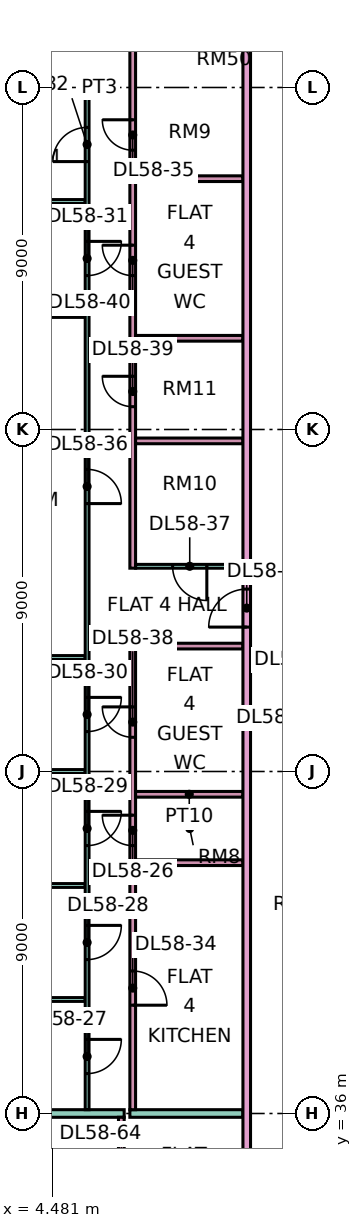
"""IFC4 building model, lengths in metres.
Left out: names, types, materials, properties, quantities, classifications, styles, units other than length and angle.
Written with IfcOpenShell. Run it as: python <this file> out.ifc"""

import sys

from ifc_helpers import new_model, si_unit, direction, frame, frame_2d, origin, place, context, subcontext, project, spatial, rectangle, extrude, element, fill, save


model = new_model("IFC4")
c1 = context("Model", 3, precision=1e-05, world=origin(), true_north=direction((0.0, 1.0)))
c2 = subcontext(c1, "Body", "Model", "MODEL_VIEW")
j1 = project(units=[si_unit("LENGTHUNIT", "METRE"), si_unit("PLANEANGLEUNIT", "RADIAN")], contexts=[c1])
p1 = place(None, origin())
s1 = spatial("IfcSite", under=j1, at=p1, CompositionType="ELEMENT")
p2 = place(p1, origin())
s2 = spatial("IfcBuilding", under=s1, at=p2, CompositionType="ELEMENT")
p3 = place(p2, frame((0.0, 0.0, 245.4)))
s3 = spatial("IfcBuildingStorey", under=s2, at=p3, CompositionType="ELEMENT", Elevation=245.4)
p4 = place(p3, frame((-1.351, 60.0, 0.0), z_axis=(0.0, 0.0, 1.0), x_axis=(1.0, 0.0, 0.0)))
e1 = element("IfcWall", 1, at=p4, inside=s3, PredefinedType="PARTITIONING", context=c2, shape_type="SweptSolid", body=[
    extrude(rectangle(XDim=6.701, YDim=0.1, at=frame_2d((3.351, 0.0))), origin(), (0.0, 0.0, 1.0), 3.35),
])
p5 = place(p3, frame((0.0, 36.0, 0.0), z_axis=(0.0, 0.0, 1.0), x_axis=(1.0, 0.0, 0.0)))
e2 = element("IfcWall", 2, at=p5, inside=s3, PredefinedType="PARTITIONING", context=c2, shape_type="SweptSolid", body=[
    extrude(rectangle(XDim=6.375, YDim=0.2, at=frame_2d((3.188, 0.0))), origin(), (0.0, 0.0, 1.0), 3.35),
])
p6 = place(p3, frame((0.0, 48.0, 0.0), z_axis=(0.0, 0.0, 1.0), x_axis=(1.0, 0.0, 0.0)))
e3 = element("IfcWall", 3, at=p6, inside=s3, PredefinedType="PARTITIONING", context=c2, shape_type="SweptSolid", body=[
    extrude(rectangle(XDim=5.35, YDim=0.1, at=frame_2d((2.675, 0.0))), origin(), (0.0, 0.0, 1.0), 3.35),
])
p7 = place(p3, frame((-1.35, 57.0, 0.0), z_axis=(0.0, 0.0, 1.0), x_axis=(1.0, 0.0, 0.0)))
e4 = element("IfcWall", 4, at=p7, inside=s3, PredefinedType="PARTITIONING", context=c2, shape_type="SweptSolid", body=[
    extrude(rectangle(XDim=6.7, YDim=0.1, at=frame_2d((3.35, 0.0))), origin(), (0.0, 0.0, 1.0), 3.35),
])
for number, where, z_axis, x_axis in (
    (5, (0.074, 39.0, 0.0), (0.0, 0.0, 1.0), (1.0, 0.0, 0.0)),
    (6, (0.074, 42.0, 0.0), (0.0, 0.0, 1.0), (1.0, 0.0, 0.0)),
    (7, (0.074, 45.0, 0.0), (0.0, 0.0, 1.0), (1.0, 0.0, 0.0)),
):
    element("IfcWall", number, at=place(p3, frame(where, z_axis=z_axis, x_axis=x_axis)), inside=s3, PredefinedType="PARTITIONING", context=c2, shape_type="SweptSolid", body=[
        extrude(rectangle(XDim=5.276, YDim=0.1, at=frame_2d((2.638, 0.0))), origin(), (0.0, 0.0, 1.0), 3.35),
    ])
p8 = place(p3, frame((5.4, 36.1, 0.0), z_axis=(0.0, 0.0, 1.0), x_axis=(0.0, 1.0, 0.0)))
e8 = element("IfcWall", 8, at=p8, inside=s3, PredefinedType="PARTITIONING", context=c2, shape_type="SweptSolid", body=[
    extrude(rectangle(XDim=26.95, YDim=0.1, at=frame_2d((13.475, 0.0))), origin(), (0.0, 0.0, 1.0), 3.35),
])
p9 = place(p8, frame((0.95, 0.0, 0.0)))
e9 = element("IfcOpeningElement", 9, at=p9, cuts=e8, PredefinedType="OPENING", context=c2, shape_type="SweptSolid", body=[
    extrude(rectangle(XDim=0.9, YDim=2.1, at=frame_2d((0.45, 1.05))), frame((0.0, 0.06, 0.0), z_axis=(0.0, -1.0, 0.0), x_axis=(1.0, 0.0, 0.0)), (0.0, 0.0, 1.0), 0.12),
])
p10 = place(p8, frame((3.95, 0.0, 0.0)))
e10 = element("IfcOpeningElement", 10, at=p10, cuts=e8, PredefinedType="OPENING", context=c2, shape_type="SweptSolid", body=[
    extrude(rectangle(XDim=0.9, YDim=2.1, at=frame_2d((0.45, 1.05))), frame((0.0, 0.06, 0.0), z_axis=(0.0, -1.0, 0.0), x_axis=(1.0, 0.0, 0.0)), (0.0, 0.0, 1.0), 0.12),
])
p11 = place(p8, frame((6.95, 0.0, 0.0)))
e11 = element("IfcOpeningElement", 11, at=p11, cuts=e8, PredefinedType="OPENING", context=c2, shape_type="SweptSolid", body=[
    extrude(rectangle(XDim=0.9, YDim=2.1, at=frame_2d((0.45, 1.05))), frame((0.0, 0.06, 0.0), z_axis=(0.0, -1.0, 0.0), x_axis=(1.0, 0.0, 0.0)), (0.0, 0.0, 1.0), 0.12),
])
p12 = place(p8, frame((9.95, 0.0, 0.0)))
e12 = element("IfcOpeningElement", 12, at=p12, cuts=e8, PredefinedType="OPENING", context=c2, shape_type="SweptSolid", body=[
    extrude(rectangle(XDim=0.9, YDim=2.1, at=frame_2d((0.45, 1.05))), frame((0.0, 0.06, 0.0), z_axis=(0.0, -1.0, 0.0), x_axis=(1.0, 0.0, 0.0)), (0.0, 0.0, 1.0), 0.12),
])
p13 = place(p8, frame((21.95, 0.0, 0.0)))
e13 = element("IfcOpeningElement", 13, at=p13, cuts=e8, PredefinedType="OPENING", context=c2, shape_type="SweptSolid", body=[
    extrude(rectangle(XDim=0.9, YDim=2.1, at=frame_2d((0.45, 1.05))), frame((0.0, 0.06, 0.0), z_axis=(0.0, -1.0, 0.0), x_axis=(1.0, 0.0, 0.0)), (0.0, 0.0, 1.0), 0.12),
])
p14 = place(p8, frame((24.95, 0.0, 0.0)))
e14 = element("IfcOpeningElement", 14, at=p14, cuts=e8, PredefinedType="OPENING", context=c2, shape_type="SweptSolid", body=[
    extrude(rectangle(XDim=0.9, YDim=2.1, at=frame_2d((0.45, 1.05))), frame((0.0, 0.06, 0.0), z_axis=(0.0, -1.0, 0.0), x_axis=(1.0, 0.0, 0.0)), (0.0, 0.0, 1.0), 0.12),
])
p15 = place(p8, frame((15.95, 0.0, 0.0)))
e15 = element("IfcOpeningElement", 15, at=p15, cuts=e8, PredefinedType="OPENING", context=c2, shape_type="SweptSolid", body=[
    extrude(rectangle(XDim=0.9, YDim=2.1, at=frame_2d((0.45, 1.05))), frame((0.0, 0.06, 0.0), z_axis=(0.0, -1.0, 0.0), x_axis=(1.0, 0.0, 0.0)), (0.0, 0.0, 1.0), 0.12),
])
p16 = place(p3, frame((5.45, 63.0, 0.0), z_axis=(0.0, 0.0, 1.0), x_axis=(1.0, 0.0, 0.0)))
e16 = element("IfcWall", 16, at=p16, inside=s3, PredefinedType="PARTITIONING", context=c2, shape_type="SweptSolid", body=[
    extrude(rectangle(XDim=0.55, YDim=0.1, at=frame_2d((0.275, 0.0))), origin(), (0.0, 0.0, 1.0), 3.35),
])
p17 = place(p3, frame((6.3, 26.325, 0.0), z_axis=(0.0, 0.0, 1.0), x_axis=(0.0, 1.0, 0.0)))
e17 = element("IfcWall", 17, at=p17, inside=s3, PredefinedType="PARTITIONING", context=c2, shape_type="SweptSolid", body=[
    extrude(rectangle(XDim=9.575, YDim=0.15, at=frame_2d((4.788, 0.0))), origin(), (0.0, 0.0, 1.0), 3.35),
])
p18 = place(p17, frame((4.575, 0.0, 0.0)))
e18 = element("IfcOpeningElement", 18, at=p18, cuts=e17, PredefinedType="OPENING", context=c2, shape_type="SweptSolid", body=[
    extrude(rectangle(XDim=0.8, YDim=2.1, at=frame_2d((0.4, 1.05))), frame((0.0, 0.085, 0.0), z_axis=(0.0, -1.0, 0.0), x_axis=(1.0, 0.0, 0.0)), (0.0, 0.0, 1.0), 0.17),
])
p19 = place(p17, frame((7.725, 0.0, 0.0)))
e19 = element("IfcOpeningElement", 19, at=p19, cuts=e17, PredefinedType="OPENING", context=c2, shape_type="SweptSolid", body=[
    extrude(rectangle(XDim=0.9, YDim=2.1, at=frame_2d((0.45, 1.05))), frame((0.0, 0.085, 0.0), z_axis=(0.0, -1.0, 0.0), x_axis=(1.0, 0.0, 0.0)), (0.0, 0.0, 1.0), 0.17),
])
p20 = place(p3, frame((6.525, 36.0, 0.0), z_axis=(0.0, 0.0, 1.0), x_axis=(1.0, 0.0, 0.0)))
e20 = element("IfcWall", 20, at=p20, inside=s3, PredefinedType="PARTITIONING", context=c2, shape_type="SweptSolid", body=[
    extrude(rectangle(XDim=2.975, YDim=0.2, at=frame_2d((1.488, 0.0))), origin(), (0.0, 0.0, 1.0), 3.35),
])
p21 = place(p3, frame((6.6, 36.1, 0.0), z_axis=(0.0, 0.0, 1.0), x_axis=(0.0, 1.0, 0.0)))
e21 = element("IfcWall", 21, at=p21, inside=s3, PredefinedType="PARTITIONING", context=c2, shape_type="SweptSolid", body=[
    extrude(rectangle(XDim=12.275, YDim=0.15, at=frame_2d((6.137, 0.0))), origin(), (0.0, 0.0, 1.0), 3.35),
])
p22 = place(p21, frame((6.95, 0.0, 0.0)))
e22 = element("IfcOpeningElement", 22, at=p22, cuts=e21, PredefinedType="OPENING", context=c2, shape_type="SweptSolid", body=[
    extrude(rectangle(XDim=0.8, YDim=2.1, at=frame_2d((0.4, 1.05))), frame((0.0, 0.085, 0.0), z_axis=(0.0, -1.0, 0.0), x_axis=(1.0, 0.0, 0.0)), (0.0, 0.0, 1.0), 0.17),
])
p23 = place(p21, frame((2.75, 0.0, 0.0)))
e23 = element("IfcOpeningElement", 23, at=p23, cuts=e21, PredefinedType="OPENING", context=c2, shape_type="SweptSolid", body=[
    extrude(rectangle(XDim=0.9, YDim=2.1, at=frame_2d((0.45, 1.05))), frame((0.0, 0.085, 0.0), z_axis=(0.0, -1.0, 0.0), x_axis=(1.0, 0.0, 0.0)), (0.0, 0.0, 1.0), 0.17),
])
p24 = place(p21, frame((9.8, 0.0, 0.0)))
e24 = element("IfcOpeningElement", 24, at=p24, cuts=e21, PredefinedType="OPENING", context=c2, shape_type="SweptSolid", body=[
    extrude(rectangle(XDim=0.8, YDim=2.1, at=frame_2d((0.4, 1.05))), frame((0.0, 0.085, 0.0), z_axis=(0.0, -1.0, 0.0), x_axis=(1.0, 0.0, 0.0)), (0.0, 0.0, 1.0), 0.17),
])
p25 = place(p3, frame((6.6, 50.35, 0.0), z_axis=(0.0, 0.0, 1.0), x_axis=(0.0, 1.0, 0.0)))
e25 = element("IfcWall", 25, at=p25, inside=s3, PredefinedType="PARTITIONING", context=c2, shape_type="SweptSolid", body=[
    extrude(rectangle(XDim=14.0, YDim=0.15, at=frame_2d((7.0, 0.0))), origin(), (0.0, 0.0, 1.0), 3.35),
])
p26 = place(p25, frame((11.0, 0.0, 0.0)))
e26 = element("IfcOpeningElement", 26, at=p26, cuts=e25, PredefinedType="OPENING", context=c2, shape_type="SweptSolid", body=[
    extrude(rectangle(XDim=0.8, YDim=2.1, at=frame_2d((0.4, 1.05))), frame((0.0, 0.085, 0.0), z_axis=(0.0, -1.0, 0.0), x_axis=(1.0, 0.0, 0.0)), (0.0, 0.0, 1.0), 0.17),
])
p27 = place(p25, frame((4.25, 0.0, 0.0)))
e27 = element("IfcOpeningElement", 27, at=p27, cuts=e25, PredefinedType="OPENING", context=c2, shape_type="SweptSolid", body=[
    extrude(rectangle(XDim=0.8, YDim=2.1, at=frame_2d((0.4, 1.05))), frame((0.0, 0.085, 0.0), z_axis=(0.0, -1.0, 0.0), x_axis=(1.0, 0.0, 0.0)), (0.0, 0.0, 1.0), 0.17),
])
p28 = place(p25, frame((7.7, 0.0, 0.0)))
e28 = element("IfcOpeningElement", 28, at=p28, cuts=e25, PredefinedType="OPENING", context=c2, shape_type="SweptSolid", body=[
    extrude(rectangle(XDim=0.8, YDim=2.1, at=frame_2d((0.4, 1.05))), frame((0.0, 0.085, 0.0), z_axis=(0.0, -1.0, 0.0), x_axis=(1.0, 0.0, 0.0)), (0.0, 0.0, 1.0), 0.17),
])
for number, where, z_axis, x_axis in (
    (29, (6.675, 42.6, 0.0), (0.0, 0.0, 1.0), (1.0, 0.0, 0.0)),
    (30, (6.675, 44.4, 0.0), (0.0, 0.0, 1.0), (1.0, 0.0, 0.0)),
    (31, (6.675, 48.3, 0.0), (0.0, 0.0, 1.0), (1.0, 0.0, 0.0)),
):
    element("IfcWall", number, at=place(p3, frame(where, z_axis=z_axis, x_axis=x_axis)), inside=s3, PredefinedType="PARTITIONING", context=c2, shape_type="SweptSolid", body=[
        extrude(rectangle(XDim=2.825, YDim=0.15, at=frame_2d((1.413, 0.0))), origin(), (0.0, 0.0, 1.0), 3.35),
    ])
p29 = place(p3, frame((6.675, 50.4, 0.0), z_axis=(0.0, 0.0, 1.0), x_axis=(1.0, 0.0, 0.0)))
e32 = element("IfcWall", 32, at=p29, inside=s3, PredefinedType="PARTITIONING", context=c2, shape_type="SweptSolid", body=[
    extrude(rectangle(XDim=2.825, YDim=0.1, at=frame_2d((1.413, 0.0))), origin(), (0.0, 0.0, 1.0), 3.35),
])
p30 = place(p29, frame((0.975, 0.0, 0.0)))
e33 = element("IfcOpeningElement", 33, at=p30, cuts=e32, PredefinedType="OPENING", context=c2, shape_type="SweptSolid", body=[
    extrude(rectangle(XDim=0.9, YDim=2.1, at=frame_2d((0.45, 1.05))), frame((0.0, 0.06, 0.0), z_axis=(0.0, -1.0, 0.0), x_axis=(1.0, 0.0, 0.0)), (0.0, 0.0, 1.0), 0.12),
])
for number, where, z_axis, x_axis in (
    (34, (6.675, 53.7, 0.0), (0.0, 0.0, 1.0), (1.0, 0.0, 0.0)),
    (35, (6.675, 56.4, 0.0), (0.0, 0.0, 1.0), (1.0, 0.0, 0.0)),
    (36, (6.675, 60.6, 0.0), (0.0, 0.0, 1.0), (1.0, 0.0, 0.0)),
):
    element("IfcWall", number, at=place(p3, frame(where, z_axis=z_axis, x_axis=x_axis)), inside=s3, PredefinedType="PARTITIONING", context=c2, shape_type="SweptSolid", body=[
        extrude(rectangle(XDim=2.825, YDim=0.15, at=frame_2d((1.413, 0.0))), origin(), (0.0, 0.0, 1.0), 3.35),
    ])
p31 = place(p3, frame((9.6, 20.0, 0.0), z_axis=(0.0, 0.0, 1.0), x_axis=(0.0, 1.0, 0.0)))
e37 = element("IfcWall", 37, at=p31, inside=s3, PredefinedType="PARTITIONING", context=c2, shape_type="SweptSolid", body=[
    extrude(rectangle(XDim=44.35, YDim=0.2, at=frame_2d((22.175, 0.0))), origin(), (0.0, 0.0, 1.0), 3.35),
])
p32 = place(p31, frame((28.8, 0.0, 0.0)))
e38 = element("IfcOpeningElement", 38, at=p32, cuts=e37, PredefinedType="OPENING", context=c2, shape_type="SweptSolid", body=[
    extrude(rectangle(XDim=1.0, YDim=2.1, at=frame_2d((0.5, 1.05))), frame((0.0, 0.11, 0.0), z_axis=(0.0, -1.0, 0.0), x_axis=(1.0, 0.0, 0.0)), (0.0, 0.0, 1.0), 0.22),
])
p33 = place(p31, frame((0.6, 0.0, 0.0)))
e39 = element("IfcOpeningElement", 39, at=p33, cuts=e37, PredefinedType="OPENING", context=c2, shape_type="SweptSolid", body=[
    extrude(rectangle(XDim=1.2, YDim=2.1, at=frame_2d((0.6, 1.05))), frame((0.0, 0.11, 0.0), z_axis=(0.0, -1.0, 0.0), x_axis=(1.0, 0.0, 0.0)), (0.0, 0.0, 1.0), 0.22),
])
p34 = place(p31, frame((3.9, 0.0, 0.0)))
e40 = element("IfcOpeningElement", 40, at=p34, cuts=e37, PredefinedType="OPENING", context=c2, shape_type="SweptSolid", body=[
    extrude(rectangle(XDim=1.0, YDim=2.1, at=frame_2d((0.5, 1.05))), frame((0.0, 0.11, 0.0), z_axis=(0.0, -1.0, 0.0), x_axis=(1.0, 0.0, 0.0)), (0.0, 0.0, 1.0), 0.22),
])
p35 = place(p22, frame((0.8, 0.0, 0.0), z_axis=(0.0, 0.0, 1.0), x_axis=(-1.0, 0.0, 0.0)))
e41 = element("IfcDoor", 41, at=p35, inside=s3, OperationType="SINGLE_SWING_RIGHT", PredefinedType="DOOR", context=c2, shape_type="SweptSolid", body=[
    extrude(rectangle(XDim=0.8, YDim=2.1, at=frame_2d((0.4, 1.05))), frame((0.0, 0.025, 0.0), z_axis=(0.0, -1.0, 0.0), x_axis=(1.0, 0.0, 0.0)), (0.0, 0.0, 1.0), 0.05),
])
fill(e22, e41)
p36 = place(p9, origin())
e42 = element("IfcDoor", 42, at=p36, inside=s3, OperationType="SINGLE_SWING_RIGHT", PredefinedType="DOOR", context=c2, shape_type="SweptSolid", body=[
    extrude(rectangle(XDim=0.9, YDim=2.1, at=frame_2d((0.45, 1.05))), frame((0.0, 0.025, 0.0), z_axis=(0.0, -1.0, 0.0), x_axis=(1.0, 0.0, 0.0)), (0.0, 0.0, 1.0), 0.05),
])
fill(e9, e42)
p37 = place(p10, origin())
e43 = element("IfcDoor", 43, at=p37, inside=s3, OperationType="SINGLE_SWING_RIGHT", PredefinedType="DOOR", context=c2, shape_type="SweptSolid", body=[
    extrude(rectangle(XDim=0.9, YDim=2.1, at=frame_2d((0.45, 1.05))), frame((0.0, 0.025, 0.0), z_axis=(0.0, -1.0, 0.0), x_axis=(1.0, 0.0, 0.0)), (0.0, 0.0, 1.0), 0.05),
])
fill(e10, e43)
p38 = place(p11, origin())
e44 = element("IfcDoor", 44, at=p38, inside=s3, OperationType="SINGLE_SWING_RIGHT", PredefinedType="DOOR", context=c2, shape_type="SweptSolid", body=[
    extrude(rectangle(XDim=0.9, YDim=2.1, at=frame_2d((0.45, 1.05))), frame((0.0, 0.025, 0.0), z_axis=(0.0, -1.0, 0.0), x_axis=(1.0, 0.0, 0.0)), (0.0, 0.0, 1.0), 0.05),
])
fill(e11, e44)
p39 = place(p12, origin())
e45 = element("IfcDoor", 45, at=p39, inside=s3, OperationType="SINGLE_SWING_RIGHT", PredefinedType="DOOR", context=c2, shape_type="SweptSolid", body=[
    extrude(rectangle(XDim=0.9, YDim=2.1, at=frame_2d((0.45, 1.05))), frame((0.0, 0.025, 0.0), z_axis=(0.0, -1.0, 0.0), x_axis=(1.0, 0.0, 0.0)), (0.0, 0.0, 1.0), 0.05),
])
fill(e12, e45)
p40 = place(p13, origin())
e46 = element("IfcDoor", 46, at=p40, inside=s3, OperationType="SINGLE_SWING_RIGHT", PredefinedType="DOOR", context=c2, shape_type="SweptSolid", body=[
    extrude(rectangle(XDim=0.9, YDim=2.1, at=frame_2d((0.45, 1.05))), frame((0.0, 0.025, 0.0), z_axis=(0.0, -1.0, 0.0), x_axis=(1.0, 0.0, 0.0)), (0.0, 0.0, 1.0), 0.05),
])
fill(e13, e46)
p41 = place(p14, origin())
e47 = element("IfcDoor", 47, at=p41, inside=s3, OperationType="SINGLE_SWING_LEFT", PredefinedType="DOOR", context=c2, shape_type="SweptSolid", body=[
    extrude(rectangle(XDim=0.9, YDim=2.1, at=frame_2d((0.45, 1.05))), frame((0.0, 0.025, 0.0), z_axis=(0.0, -1.0, 0.0), x_axis=(1.0, 0.0, 0.0)), (0.0, 0.0, 1.0), 0.05),
])
fill(e14, e47)
p42 = place(p32, origin())
e48 = element("IfcDoor", 48, at=p42, inside=s3, OperationType="SINGLE_SWING_LEFT", PredefinedType="DOOR", context=c2, shape_type="SweptSolid", body=[
    extrude(rectangle(XDim=1.0, YDim=2.1, at=frame_2d((0.5, 1.05))), frame((0.0, 0.025, 0.0), z_axis=(0.0, -1.0, 0.0), x_axis=(1.0, 0.0, 0.0)), (0.0, 0.0, 1.0), 0.05),
])
fill(e38, e48)
p43 = place(p23, frame((0.9, 0.0, 0.0), z_axis=(0.0, 0.0, 1.0), x_axis=(-1.0, 0.0, 0.0)))
e49 = element("IfcDoor", 49, at=p43, inside=s3, OperationType="SINGLE_SWING_LEFT", PredefinedType="DOOR", context=c2, shape_type="SweptSolid", body=[
    extrude(rectangle(XDim=0.9, YDim=2.1, at=frame_2d((0.45, 1.05))), frame((0.0, 0.025, 0.0), z_axis=(0.0, -1.0, 0.0), x_axis=(1.0, 0.0, 0.0)), (0.0, 0.0, 1.0), 0.05),
])
fill(e23, e49)
p44 = place(p26, frame((0.8, 0.0, 0.0), z_axis=(0.0, 0.0, 1.0), x_axis=(-1.0, 0.0, 0.0)))
e50 = element("IfcDoor", 50, at=p44, inside=s3, OperationType="SINGLE_SWING_RIGHT", PredefinedType="DOOR", context=c2, shape_type="SweptSolid", body=[
    extrude(rectangle(XDim=0.8, YDim=2.1, at=frame_2d((0.4, 1.05))), frame((0.0, 0.025, 0.0), z_axis=(0.0, -1.0, 0.0), x_axis=(1.0, 0.0, 0.0)), (0.0, 0.0, 1.0), 0.05),
])
fill(e26, e50)
p45 = place(p15, frame((0.9, 0.0, 0.0), z_axis=(0.0, 0.0, 1.0), x_axis=(-1.0, 0.0, 0.0)))
e51 = element("IfcDoor", 51, at=p45, inside=s3, OperationType="SINGLE_SWING_LEFT", PredefinedType="DOOR", context=c2, shape_type="SweptSolid", body=[
    extrude(rectangle(XDim=0.9, YDim=2.1, at=frame_2d((0.45, 1.05))), frame((0.0, 0.025, 0.0), z_axis=(0.0, -1.0, 0.0), x_axis=(1.0, 0.0, 0.0)), (0.0, 0.0, 1.0), 0.05),
])
fill(e15, e51)
p46 = place(p30, origin())
e52 = element("IfcDoor", 52, at=p46, inside=s3, OperationType="SINGLE_SWING_RIGHT", PredefinedType="DOOR", context=c2, shape_type="SweptSolid", body=[
    extrude(rectangle(XDim=0.9, YDim=2.1, at=frame_2d((0.45, 1.05))), frame((0.0, 0.025, 0.0), z_axis=(0.0, -1.0, 0.0), x_axis=(1.0, 0.0, 0.0)), (0.0, 0.0, 1.0), 0.05),
])
fill(e33, e52)
p47 = place(p24, frame((0.8, 0.0, 0.0), z_axis=(0.0, 0.0, 1.0), x_axis=(-1.0, 0.0, 0.0)))
e53 = element("IfcDoor", 53, at=p47, inside=s3, OperationType="SINGLE_SWING_RIGHT", PredefinedType="DOOR", context=c2, shape_type="SweptSolid", body=[
    extrude(rectangle(XDim=0.8, YDim=2.1, at=frame_2d((0.4, 1.05))), frame((0.0, 0.025, 0.0), z_axis=(0.0, -1.0, 0.0), x_axis=(1.0, 0.0, 0.0)), (0.0, 0.0, 1.0), 0.05),
])
fill(e24, e53)
p48 = place(p27, frame((0.8, 0.0, 0.0), z_axis=(0.0, 0.0, 1.0), x_axis=(-1.0, 0.0, 0.0)))
e54 = element("IfcDoor", 54, at=p48, inside=s3, OperationType="SINGLE_SWING_RIGHT", PredefinedType="DOOR", context=c2, shape_type="SweptSolid", body=[
    extrude(rectangle(XDim=0.8, YDim=2.1, at=frame_2d((0.4, 1.05))), frame((0.0, 0.025, 0.0), z_axis=(0.0, -1.0, 0.0), x_axis=(1.0, 0.0, 0.0)), (0.0, 0.0, 1.0), 0.05),
])
fill(e27, e54)
p49 = place(p28, frame((0.8, 0.0, 0.0), z_axis=(0.0, 0.0, 1.0), x_axis=(-1.0, 0.0, 0.0)))
e55 = element("IfcDoor", 55, at=p49, inside=s3, OperationType="SINGLE_SWING_RIGHT", PredefinedType="DOOR", context=c2, shape_type="SweptSolid", body=[
    extrude(rectangle(XDim=0.8, YDim=2.1, at=frame_2d((0.4, 1.05))), frame((0.0, 0.025, 0.0), z_axis=(0.0, -1.0, 0.0), x_axis=(1.0, 0.0, 0.0)), (0.0, 0.0, 1.0), 0.05),
])
fill(e28, e55)
save(model, sys.argv[1])
